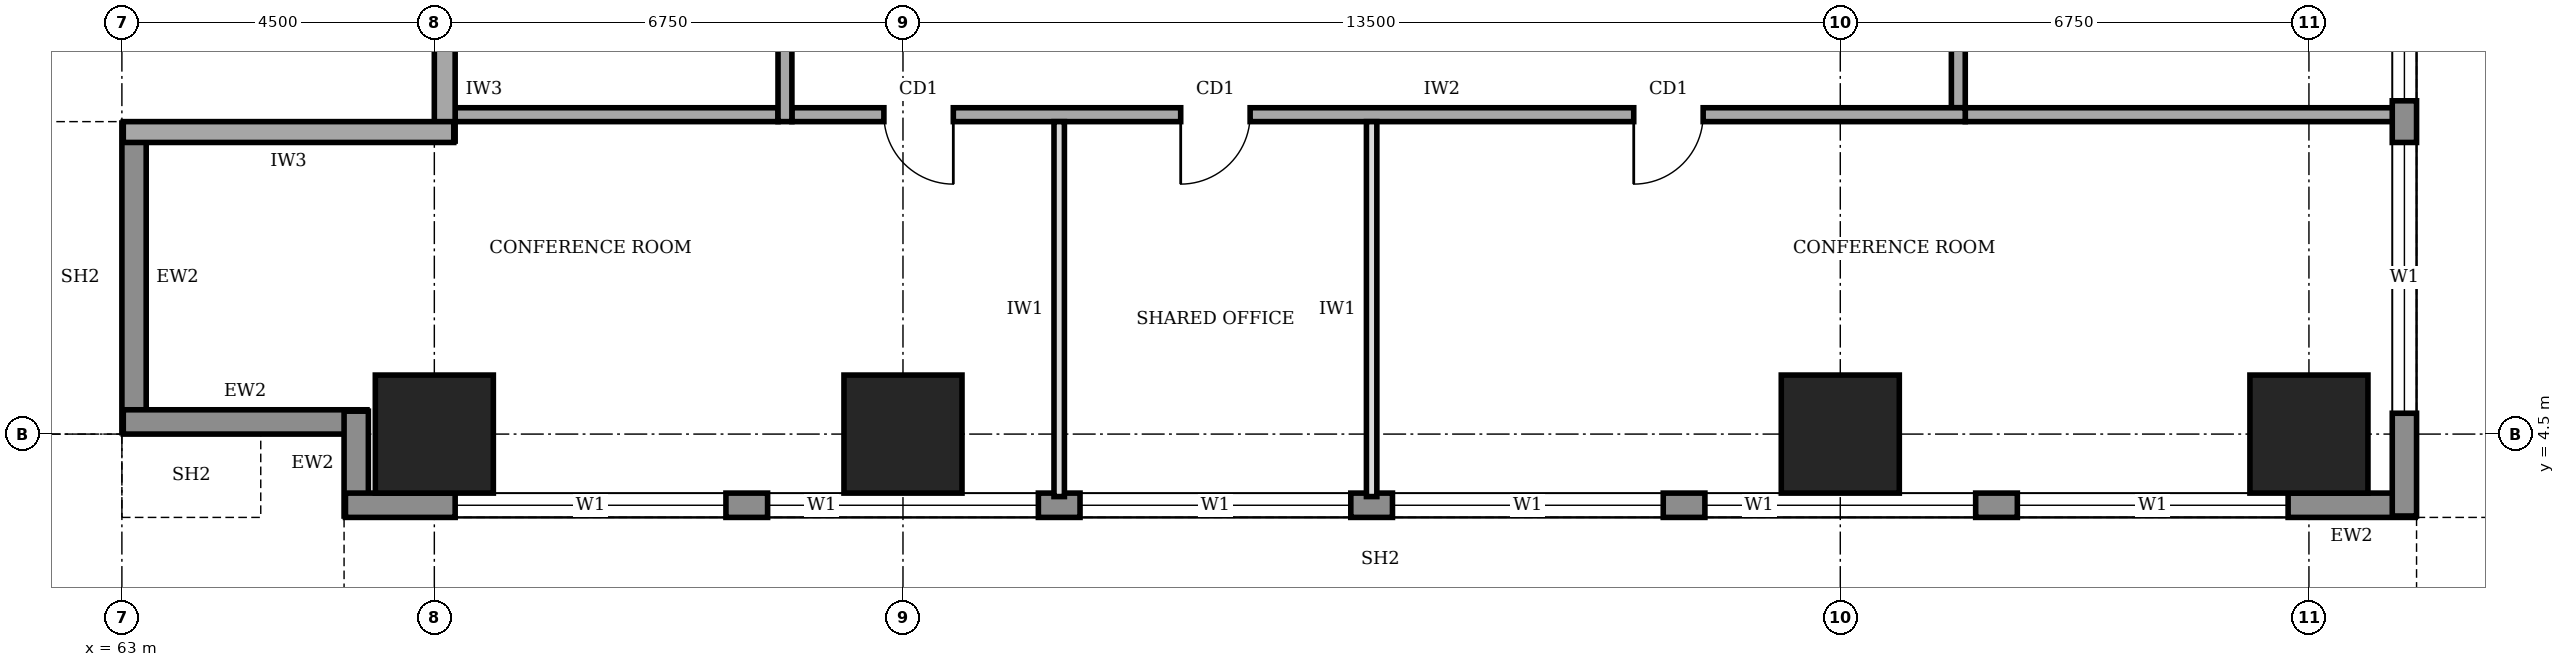
"""IFC4 building model, lengths in metres.
Left out: names, types, materials, properties, quantities, classifications, styles, units other than length and angle.
Written with IfcOpenShell. Run it as: python <this file> out.ifc"""

import sys

from ifc_helpers import new_model, si_unit, direction, frame, frame_2d, origin, origin_2d, place, context, subcontext, project, spatial, rectangle, extrude, element, fill, save


model = new_model("IFC4")
c1 = context("Model", 3, precision=1e-05, world=origin(), true_north=direction((0.0, 1.0)))
c2 = subcontext(c1, "Body", "Model", "MODEL_VIEW")
j1 = project(units=[si_unit("LENGTHUNIT", "METRE"), si_unit("PLANEANGLEUNIT", "RADIAN")], contexts=[c1])
p1 = place(None, origin())
s1 = spatial("IfcSite", under=j1, at=p1, CompositionType="ELEMENT")
p2 = place(p1, origin())
s2 = spatial("IfcBuilding", under=s1, at=p2, CompositionType="ELEMENT")
p3 = place(p2, frame((0.0, 0.0, 133.0)))
s3 = spatial("IfcBuildingStorey", under=s2, at=p3, CompositionType="ELEMENT", Elevation=133.0)
for number, where, z_axis, x_axis in (
    (1, (67.5, 4.5, 0.0), (0.0, 0.0, 1.0), (1.0, 0.0, 0.0)),
    (2, (74.25, 4.5, 0.0), (0.0, 0.0, 1.0), (1.0, 0.0, 0.0)),
    (3, (87.75, 4.5, 0.0), (0.0, 0.0, 1.0), (1.0, 0.0, 0.0)),
    (4, (94.5, 4.5, 0.0), (0.0, 0.0, 1.0), (1.0, 0.0, 0.0)),
):
    element("IfcColumn", number, at=place(p3, frame(where, z_axis=z_axis, x_axis=x_axis)), inside=s3, PredefinedType="COLUMN", context=c2, shape_type="SweptSolid", body=[
        extrude(rectangle(XDim=1.7, YDim=1.7, at=origin_2d()), origin(), (0.0, 0.0, 1.0), 4.0),
    ])
p4 = place(p3, frame((63.175, 8.98, 0.0), z_axis=(0.0, 0.0, 1.0), x_axis=(0.0, -1.0, 0.0)))
e5 = element("IfcWall", 5, at=p4, inside=s3, PredefinedType="STANDARD", context=c2, shape_type="SweptSolid", body=[
    extrude(rectangle(XDim=4.46, YDim=0.35, at=frame_2d((2.23, 0.0))), origin(), (0.0, 0.0, 1.0), 3.75),
])
p5 = place(p3, frame((63.02, 4.675, 0.0), z_axis=(0.0, 0.0, 1.0), x_axis=(1.0, 0.0, 0.0)))
e6 = element("IfcWall", 6, at=p5, inside=s3, PredefinedType="STANDARD", context=c2, shape_type="SweptSolid", body=[
    extrude(rectangle(XDim=3.51, YDim=0.35, at=frame_2d((1.755, 0.0))), origin(), (0.0, 0.0, 1.0), 2.85),
])
p6 = place(p3, frame((66.375, 4.83, 0.0), z_axis=(0.0, 0.0, 1.0), x_axis=(0.0, -1.0, 0.0)))
e7 = element("IfcWall", 7, at=p6, inside=s3, PredefinedType="STANDARD", context=c2, shape_type="SweptSolid", body=[
    extrude(rectangle(XDim=1.51, YDim=0.35, at=frame_2d((0.755, 0.0))), origin(), (0.0, 0.0, 1.0), 3.75),
])
p7 = place(p3, frame((66.22, 3.475, 0.0), z_axis=(0.0, 0.0, 1.0), x_axis=(1.0, 0.0, 0.0)))
e8 = element("IfcWall", 8, at=p7, inside=s3, PredefinedType="STANDARD", context=c2, shape_type="SweptSolid", body=[
    extrude(rectangle(XDim=29.81, YDim=0.35, at=frame_2d((14.905, 0.0))), origin(), (0.0, 0.0, 1.0), 3.75),
])
p8 = place(p7, frame((1.58, 0.0, 0.9)))
e9 = element("IfcOpeningElement", 9, at=p8, cuts=e8, PredefinedType="OPENING", context=c2, shape_type="SweptSolid", body=[
    extrude(rectangle(XDim=3.9, YDim=2.2, at=frame_2d((1.95, 1.1))), frame((0.0, 0.185, 0.0), z_axis=(0.0, -1.0, 0.0), x_axis=(1.0, 0.0, 0.0)), (0.0, 0.0, 1.0), 0.37),
])
p9 = place(p7, frame((6.08, 0.0, 0.9)))
e10 = element("IfcOpeningElement", 10, at=p9, cuts=e8, PredefinedType="OPENING", context=c2, shape_type="SweptSolid", body=[
    extrude(rectangle(XDim=3.9, YDim=2.2, at=frame_2d((1.95, 1.1))), frame((0.0, 0.185, 0.0), z_axis=(0.0, -1.0, 0.0), x_axis=(1.0, 0.0, 0.0)), (0.0, 0.0, 1.0), 0.37),
])
p10 = place(p7, frame((10.58, 0.0, 0.9)))
e11 = element("IfcOpeningElement", 11, at=p10, cuts=e8, PredefinedType="OPENING", context=c2, shape_type="SweptSolid", body=[
    extrude(rectangle(XDim=3.9, YDim=2.2, at=frame_2d((1.95, 1.1))), frame((0.0, 0.185, 0.0), z_axis=(0.0, -1.0, 0.0), x_axis=(1.0, 0.0, 0.0)), (0.0, 0.0, 1.0), 0.37),
])
p11 = place(p7, frame((15.08, 0.0, 0.9)))
e12 = element("IfcOpeningElement", 12, at=p11, cuts=e8, PredefinedType="OPENING", context=c2, shape_type="SweptSolid", body=[
    extrude(rectangle(XDim=3.9, YDim=2.2, at=frame_2d((1.95, 1.1))), frame((0.0, 0.185, 0.0), z_axis=(0.0, -1.0, 0.0), x_axis=(1.0, 0.0, 0.0)), (0.0, 0.0, 1.0), 0.37),
])
p12 = place(p7, frame((19.58, 0.0, 0.9)))
e13 = element("IfcOpeningElement", 13, at=p12, cuts=e8, PredefinedType="OPENING", context=c2, shape_type="SweptSolid", body=[
    extrude(rectangle(XDim=3.9, YDim=2.2, at=frame_2d((1.95, 1.1))), frame((0.0, 0.185, 0.0), z_axis=(0.0, -1.0, 0.0), x_axis=(1.0, 0.0, 0.0)), (0.0, 0.0, 1.0), 0.37),
])
p13 = place(p7, frame((24.08, 0.0, 0.9)))
e14 = element("IfcOpeningElement", 14, at=p13, cuts=e8, PredefinedType="OPENING", context=c2, shape_type="SweptSolid", body=[
    extrude(rectangle(XDim=3.9, YDim=2.2, at=frame_2d((1.95, 1.1))), frame((0.0, 0.185, 0.0), z_axis=(0.0, -1.0, 0.0), x_axis=(1.0, 0.0, 0.0)), (0.0, 0.0, 1.0), 0.37),
])
p14 = place(p3, frame((95.875, 3.32, 0.0), z_axis=(0.0, 0.0, 1.0), x_axis=(0.0, 1.0, 0.0)))
e15 = element("IfcWall", 15, at=p14, inside=s3, PredefinedType="STANDARD", context=c2, shape_type="SweptSolid", body=[
    extrude(rectangle(XDim=33.96, YDim=0.35, at=frame_2d((16.98, 0.0))), origin(), (0.0, 0.0, 1.0), 3.75),
])
p15 = place(p14, frame((1.48, 0.0, 0.9)))
e16 = element("IfcOpeningElement", 16, at=p15, cuts=e15, PredefinedType="OPENING", context=c2, shape_type="SweptSolid", body=[
    extrude(rectangle(XDim=3.9, YDim=2.2, at=frame_2d((1.95, 1.1))), frame((0.0, 0.185, 0.0), z_axis=(0.0, -1.0, 0.0), x_axis=(1.0, 0.0, 0.0)), (0.0, 0.0, 1.0), 0.37),
])
p16 = place(p14, frame((5.98, 0.0, 0.9)))
e17 = element("IfcOpeningElement", 17, at=p16, cuts=e15, PredefinedType="OPENING", context=c2, shape_type="SweptSolid", body=[
    extrude(rectangle(XDim=3.9, YDim=2.2, at=frame_2d((1.95, 1.1))), frame((0.0, 0.185, 0.0), z_axis=(0.0, -1.0, 0.0), x_axis=(1.0, 0.0, 0.0)), (0.0, 0.0, 1.0), 0.37),
])
p17 = place(p14, frame((10.48, 0.0, 0.9)))
e18 = element("IfcOpeningElement", 18, at=p17, cuts=e15, PredefinedType="OPENING", context=c2, shape_type="SweptSolid", body=[
    extrude(rectangle(XDim=3.9, YDim=2.2, at=frame_2d((1.95, 1.1))), frame((0.0, 0.185, 0.0), z_axis=(0.0, -1.0, 0.0), x_axis=(1.0, 0.0, 0.0)), (0.0, 0.0, 1.0), 0.37),
])
p18 = place(p14, frame((14.98, 0.0, 0.9)))
e19 = element("IfcOpeningElement", 19, at=p18, cuts=e15, PredefinedType="OPENING", context=c2, shape_type="SweptSolid", body=[
    extrude(rectangle(XDim=3.9, YDim=2.2, at=frame_2d((1.95, 1.1))), frame((0.0, 0.185, 0.0), z_axis=(0.0, -1.0, 0.0), x_axis=(1.0, 0.0, 0.0)), (0.0, 0.0, 1.0), 0.37),
])
p19 = place(p14, frame((19.48, 0.0, 0.9)))
e20 = element("IfcOpeningElement", 20, at=p19, cuts=e15, PredefinedType="OPENING", context=c2, shape_type="SweptSolid", body=[
    extrude(rectangle(XDim=3.9, YDim=2.2, at=frame_2d((1.95, 1.1))), frame((0.0, 0.185, 0.0), z_axis=(0.0, -1.0, 0.0), x_axis=(1.0, 0.0, 0.0)), (0.0, 0.0, 1.0), 0.37),
])
p20 = place(p14, frame((23.98, 0.0, 0.9)))
e21 = element("IfcOpeningElement", 21, at=p20, cuts=e15, PredefinedType="OPENING", context=c2, shape_type="SweptSolid", body=[
    extrude(rectangle(XDim=3.9, YDim=2.2, at=frame_2d((1.95, 1.1))), frame((0.0, 0.185, 0.0), z_axis=(0.0, -1.0, 0.0), x_axis=(1.0, 0.0, 0.0)), (0.0, 0.0, 1.0), 0.37),
])
p21 = place(p14, frame((28.48, 0.0, 0.9)))
e22 = element("IfcOpeningElement", 22, at=p21, cuts=e15, PredefinedType="OPENING", context=c2, shape_type="SweptSolid", body=[
    extrude(rectangle(XDim=3.9, YDim=2.2, at=frame_2d((1.95, 1.1))), frame((0.0, 0.185, 0.0), z_axis=(0.0, -1.0, 0.0), x_axis=(1.0, 0.0, 0.0)), (0.0, 0.0, 1.0), 0.37),
])
p22 = place(p3, frame((67.65, 10.2, 0.0), z_axis=(0.0, 0.0, 1.0), x_axis=(0.0, -1.0, 0.0)))
e23 = element("IfcWall", 23, at=p22, inside=s3, PredefinedType="SOLIDWALL", context=c2, shape_type="SweptSolid", body=[
    extrude(rectangle(XDim=1.48, YDim=0.3, at=frame_2d((0.74, 0.0))), origin(), (0.0, 0.0, 1.0), 2.65),
])
p23 = place(p3, frame((67.78, 8.85, 0.0), z_axis=(0.0, 0.0, 1.0), x_axis=(-1.0, 0.0, 0.0)))
e24 = element("IfcWall", 24, at=p23, inside=s3, PredefinedType="SOLIDWALL", context=c2, shape_type="SweptSolid", body=[
    extrude(rectangle(XDim=4.76, YDim=0.3, at=frame_2d((2.38, 0.0))), origin(), (0.0, 0.0, 1.0), 3.75),
])
p24 = place(p3, frame((72.65, 9.1, 0.0), z_axis=(0.0, 0.0, 1.0), x_axis=(1.0, 0.0, 0.0)))
e25 = element("IfcWall", 25, at=p24, inside=s3, PredefinedType="SOLIDWALL", context=c2, shape_type="SweptSolid", body=[
    extrude(rectangle(XDim=16.9, YDim=0.2, at=frame_2d((8.45, 0.0))), origin(), (0.0, 0.0, 1.0), 3.75),
])
p25 = place(p24, frame((1.325, 0.0, 0.0)))
e26 = element("IfcOpeningElement", 26, at=p25, cuts=e25, PredefinedType="OPENING", context=c2, shape_type="SweptSolid", body=[
    extrude(rectangle(XDim=1.0, YDim=2.1, at=frame_2d((0.5, 1.05))), frame((0.0, 0.11, 0.0), z_axis=(0.0, -1.0, 0.0), x_axis=(1.0, 0.0, 0.0)), (0.0, 0.0, 1.0), 0.22),
])
p26 = place(p24, frame((5.6, 0.0, 0.0)))
e27 = element("IfcOpeningElement", 27, at=p26, cuts=e25, PredefinedType="OPENING", context=c2, shape_type="SweptSolid", body=[
    extrude(rectangle(XDim=1.0, YDim=2.1, at=frame_2d((0.5, 1.05))), frame((0.0, 0.11, 0.0), z_axis=(0.0, -1.0, 0.0), x_axis=(1.0, 0.0, 0.0)), (0.0, 0.0, 1.0), 0.22),
])
p27 = place(p24, frame((12.125, 0.0, 0.0)))
e28 = element("IfcOpeningElement", 28, at=p27, cuts=e25, PredefinedType="OPENING", context=c2, shape_type="SweptSolid", body=[
    extrude(rectangle(XDim=1.0, YDim=2.1, at=frame_2d((0.5, 1.05))), frame((0.0, 0.11, 0.0), z_axis=(0.0, -1.0, 0.0), x_axis=(1.0, 0.0, 0.0)), (0.0, 0.0, 1.0), 0.22),
])
p28 = place(p3, frame((89.45, 9.2, 0.0), z_axis=(0.0, 0.0, 1.0), x_axis=(0.0, 1.0, 0.0)))
e29 = element("IfcWall", 29, at=p28, inside=s3, PredefinedType="SOLIDWALL", context=c2, shape_type="SweptSolid", body=[
    extrude(rectangle(XDim=22.3, YDim=0.2, at=frame_2d((11.15, 0.0))), origin(), (0.0, 0.0, 1.0), 3.75),
])
p29 = place(p28, frame((1.625, 0.0, 0.0)))
e30 = element("IfcOpeningElement", 30, at=p29, cuts=e29, PredefinedType="OPENING", context=c2, shape_type="SweptSolid", body=[
    extrude(rectangle(XDim=1.0, YDim=2.1, at=frame_2d((0.5, 1.05))), frame((0.0, 0.11, 0.0), z_axis=(0.0, -1.0, 0.0), x_axis=(1.0, 0.0, 0.0)), (0.0, 0.0, 1.0), 0.22),
])
p30 = place(p28, frame((5.2, 0.0, 0.0)))
e31 = element("IfcOpeningElement", 31, at=p30, cuts=e29, PredefinedType="OPENING", context=c2, shape_type="SweptSolid", body=[
    extrude(rectangle(XDim=0.9, YDim=2.1, at=frame_2d((0.45, 1.05))), frame((0.0, 0.11, 0.0), z_axis=(0.0, -1.0, 0.0), x_axis=(1.0, 0.0, 0.0)), (0.0, 0.0, 1.0), 0.22),
])
p31 = place(p28, frame((8.325, 0.0, 0.0)))
e32 = element("IfcOpeningElement", 32, at=p31, cuts=e29, PredefinedType="OPENING", context=c2, shape_type="SweptSolid", body=[
    extrude(rectangle(XDim=0.9, YDim=2.1, at=frame_2d((0.45, 1.05))), frame((0.0, 0.11, 0.0), z_axis=(0.0, -1.0, 0.0), x_axis=(1.0, 0.0, 0.0)), (0.0, 0.0, 1.0), 0.22),
])
p32 = place(p28, frame((13.725, 0.0, 0.0)))
e33 = element("IfcOpeningElement", 33, at=p32, cuts=e29, PredefinedType="OPENING", context=c2, shape_type="SweptSolid", body=[
    extrude(rectangle(XDim=0.9, YDim=2.1, at=frame_2d((0.45, 1.05))), frame((0.0, 0.11, 0.0), z_axis=(0.0, -1.0, 0.0), x_axis=(1.0, 0.0, 0.0)), (0.0, 0.0, 1.0), 0.22),
])
p33 = place(p28, frame((16.15, 0.0, 0.0)))
e34 = element("IfcOpeningElement", 34, at=p33, cuts=e29, PredefinedType="OPENING", context=c2, shape_type="SweptSolid", body=[
    extrude(rectangle(XDim=1.0, YDim=2.1, at=frame_2d((0.5, 1.05))), frame((0.0, 0.11, 0.0), z_axis=(0.0, -1.0, 0.0), x_axis=(1.0, 0.0, 0.0)), (0.0, 0.0, 1.0), 0.22),
])
p34 = place(p28, frame((11.2, 0.0, 0.0)))
e35 = element("IfcOpeningElement", 35, at=p34, cuts=e29, PredefinedType="OPENING", context=c2, shape_type="SweptSolid", body=[
    extrude(rectangle(XDim=1.0, YDim=2.1, at=frame_2d((0.5, 1.05))), frame((0.0, 0.11, 0.0), z_axis=(0.0, -1.0, 0.0), x_axis=(1.0, 0.0, 0.0)), (0.0, 0.0, 1.0), 0.22),
])
p35 = place(p28, frame((19.475, 0.0, 0.0)))
e36 = element("IfcOpeningElement", 36, at=p35, cuts=e29, PredefinedType="OPENING", context=c2, shape_type="SweptSolid", body=[
    extrude(rectangle(XDim=1.0, YDim=2.1, at=frame_2d((0.5, 1.05))), frame((0.0, 0.11, 0.0), z_axis=(0.0, -1.0, 0.0), x_axis=(1.0, 0.0, 0.0)), (0.0, 0.0, 1.0), 0.22),
])
p36 = place(p3, frame((72.55, 31.3, 0.0), z_axis=(0.0, 0.0, 1.0), x_axis=(0.0, -1.0, 0.0)))
e37 = element("IfcWall", 37, at=p36, inside=s3, PredefinedType="SOLIDWALL", context=c2, shape_type="SweptSolid", body=[
    extrude(rectangle(XDim=22.3, YDim=0.2, at=frame_2d((11.15, 0.0))), origin(), (0.0, 0.0, 1.0), 3.75),
])
p37 = place(p36, frame((10.15, 0.0, 0.0)))
e38 = element("IfcOpeningElement", 38, at=p37, cuts=e37, PredefinedType="OPENING", context=c2, shape_type="SweptSolid", body=[
    extrude(rectangle(XDim=1.8, YDim=2.1, at=frame_2d((0.9, 1.05))), frame((0.0, 0.11, 0.0), z_axis=(0.0, -1.0, 0.0), x_axis=(1.0, 0.0, 0.0)), (0.0, 0.0, 1.0), 0.22),
])
p38 = place(p3, frame((67.8, 9.1, 0.0), z_axis=(0.0, 0.0, 1.0), x_axis=(1.0, 0.0, 0.0)))
e39 = element("IfcWall", 39, at=p38, inside=s3, PredefinedType="SOLIDWALL", context=c2, shape_type="SweptSolid", body=[
    extrude(rectangle(XDim=4.65, YDim=0.2, at=frame_2d((2.325, 0.0))), origin(), (0.0, 0.0, 1.0), 3.75),
])
p39 = place(p3, frame((89.55, 9.1, 0.0), z_axis=(0.0, 0.0, 1.0), x_axis=(1.0, 0.0, 0.0)))
e40 = element("IfcWall", 40, at=p39, inside=s3, PredefinedType="SOLIDWALL", context=c2, shape_type="SweptSolid", body=[
    extrude(rectangle(XDim=6.2, YDim=0.2, at=frame_2d((3.1, 0.0))), origin(), (0.0, 0.0, 1.0), 3.75),
])
for number, where, z_axis, x_axis in (
    (41, (76.5, 3.6, 0.0), (0.0, 0.0, 1.0), (0.0, 1.0, 0.0)),
    (42, (81.0, 3.6, 0.0), (0.0, 0.0, 1.0), (0.0, 1.0, 0.0)),
):
    element("IfcWall", number, at=place(p3, frame(where, z_axis=z_axis, x_axis=x_axis)), inside=s3, PredefinedType="PARTITIONING", context=c2, shape_type="SweptSolid", body=[
        extrude(rectangle(XDim=5.4, YDim=0.15, at=frame_2d((2.7, 0.0))), origin(), (0.0, 0.0, 1.0), 3.75),
    ])
p40 = place(p8, origin())
e43 = element("IfcWindow", 43, at=p40, inside=s3, PartitioningType="SINGLE_PANEL", PredefinedType="WINDOW", context=c2, shape_type="SweptSolid", body=[
    extrude(rectangle(XDim=3.9, YDim=2.2, at=frame_2d((1.95, 1.1))), frame((0.0, 0.03, 0.0), z_axis=(0.0, -1.0, 0.0), x_axis=(1.0, 0.0, 0.0)), (0.0, 0.0, 1.0), 0.06),
])
fill(e9, e43)
p41 = place(p9, origin())
e44 = element("IfcWindow", 44, at=p41, inside=s3, PartitioningType="SINGLE_PANEL", PredefinedType="WINDOW", context=c2, shape_type="SweptSolid", body=[
    extrude(rectangle(XDim=3.9, YDim=2.2, at=frame_2d((1.95, 1.1))), frame((0.0, 0.03, 0.0), z_axis=(0.0, -1.0, 0.0), x_axis=(1.0, 0.0, 0.0)), (0.0, 0.0, 1.0), 0.06),
])
fill(e10, e44)
p42 = place(p10, origin())
e45 = element("IfcWindow", 45, at=p42, inside=s3, PartitioningType="SINGLE_PANEL", PredefinedType="WINDOW", context=c2, shape_type="SweptSolid", body=[
    extrude(rectangle(XDim=3.9, YDim=2.2, at=frame_2d((1.95, 1.1))), frame((0.0, 0.03, 0.0), z_axis=(0.0, -1.0, 0.0), x_axis=(1.0, 0.0, 0.0)), (0.0, 0.0, 1.0), 0.06),
])
fill(e11, e45)
p43 = place(p11, origin())
e46 = element("IfcWindow", 46, at=p43, inside=s3, PartitioningType="SINGLE_PANEL", PredefinedType="WINDOW", context=c2, shape_type="SweptSolid", body=[
    extrude(rectangle(XDim=3.9, YDim=2.2, at=frame_2d((1.95, 1.1))), frame((0.0, 0.03, 0.0), z_axis=(0.0, -1.0, 0.0), x_axis=(1.0, 0.0, 0.0)), (0.0, 0.0, 1.0), 0.06),
])
fill(e12, e46)
p44 = place(p12, origin())
e47 = element("IfcWindow", 47, at=p44, inside=s3, PartitioningType="SINGLE_PANEL", PredefinedType="WINDOW", context=c2, shape_type="SweptSolid", body=[
    extrude(rectangle(XDim=3.9, YDim=2.2, at=frame_2d((1.95, 1.1))), frame((0.0, 0.03, 0.0), z_axis=(0.0, -1.0, 0.0), x_axis=(1.0, 0.0, 0.0)), (0.0, 0.0, 1.0), 0.06),
])
fill(e13, e47)
p45 = place(p13, origin())
e48 = element("IfcWindow", 48, at=p45, inside=s3, PartitioningType="SINGLE_PANEL", PredefinedType="WINDOW", context=c2, shape_type="SweptSolid", body=[
    extrude(rectangle(XDim=3.9, YDim=2.2, at=frame_2d((1.95, 1.1))), frame((0.0, 0.03, 0.0), z_axis=(0.0, -1.0, 0.0), x_axis=(1.0, 0.0, 0.0)), (0.0, 0.0, 1.0), 0.06),
])
fill(e14, e48)
p46 = place(p15, origin())
e49 = element("IfcWindow", 49, at=p46, inside=s3, PartitioningType="SINGLE_PANEL", PredefinedType="WINDOW", context=c2, shape_type="SweptSolid", body=[
    extrude(rectangle(XDim=3.9, YDim=2.2, at=frame_2d((1.95, 1.1))), frame((0.0, 0.03, 0.0), z_axis=(0.0, -1.0, 0.0), x_axis=(1.0, 0.0, 0.0)), (0.0, 0.0, 1.0), 0.06),
])
fill(e16, e49)
p47 = place(p16, origin())
e50 = element("IfcWindow", 50, at=p47, inside=s3, PartitioningType="SINGLE_PANEL", PredefinedType="WINDOW", context=c2, shape_type="SweptSolid", body=[
    extrude(rectangle(XDim=3.9, YDim=2.2, at=frame_2d((1.95, 1.1))), frame((0.0, 0.03, 0.0), z_axis=(0.0, -1.0, 0.0), x_axis=(1.0, 0.0, 0.0)), (0.0, 0.0, 1.0), 0.06),
])
fill(e17, e50)
p48 = place(p25, frame((1.0, 0.0, 0.0), z_axis=(0.0, 0.0, 1.0), x_axis=(-1.0, 0.0, 0.0)))
e51 = element("IfcDoor", 51, at=p48, inside=s3, OperationType="SINGLE_SWING_LEFT", PredefinedType="DOOR", context=c2, shape_type="SweptSolid", body=[
    extrude(rectangle(XDim=1.0, YDim=2.1, at=frame_2d((0.5, 1.05))), frame((0.0, 0.025, 0.0), z_axis=(0.0, -1.0, 0.0), x_axis=(1.0, 0.0, 0.0)), (0.0, 0.0, 1.0), 0.05),
])
fill(e26, e51)
p49 = place(p26, frame((1.0, 0.0, 0.0), z_axis=(0.0, 0.0, 1.0), x_axis=(-1.0, 0.0, 0.0)))
e52 = element("IfcDoor", 52, at=p49, inside=s3, OperationType="SINGLE_SWING_RIGHT", PredefinedType="DOOR", context=c2, shape_type="SweptSolid", body=[
    extrude(rectangle(XDim=1.0, YDim=2.1, at=frame_2d((0.5, 1.05))), frame((0.0, 0.025, 0.0), z_axis=(0.0, -1.0, 0.0), x_axis=(1.0, 0.0, 0.0)), (0.0, 0.0, 1.0), 0.05),
])
fill(e27, e52)
p50 = place(p27, frame((1.0, 0.0, 0.0), z_axis=(0.0, 0.0, 1.0), x_axis=(-1.0, 0.0, 0.0)))
e53 = element("IfcDoor", 53, at=p50, inside=s3, OperationType="SINGLE_SWING_RIGHT", PredefinedType="DOOR", context=c2, shape_type="SweptSolid", body=[
    extrude(rectangle(XDim=1.0, YDim=2.1, at=frame_2d((0.5, 1.05))), frame((0.0, 0.025, 0.0), z_axis=(0.0, -1.0, 0.0), x_axis=(1.0, 0.0, 0.0)), (0.0, 0.0, 1.0), 0.05),
])
fill(e28, e53)
save(model, sys.argv[1])
